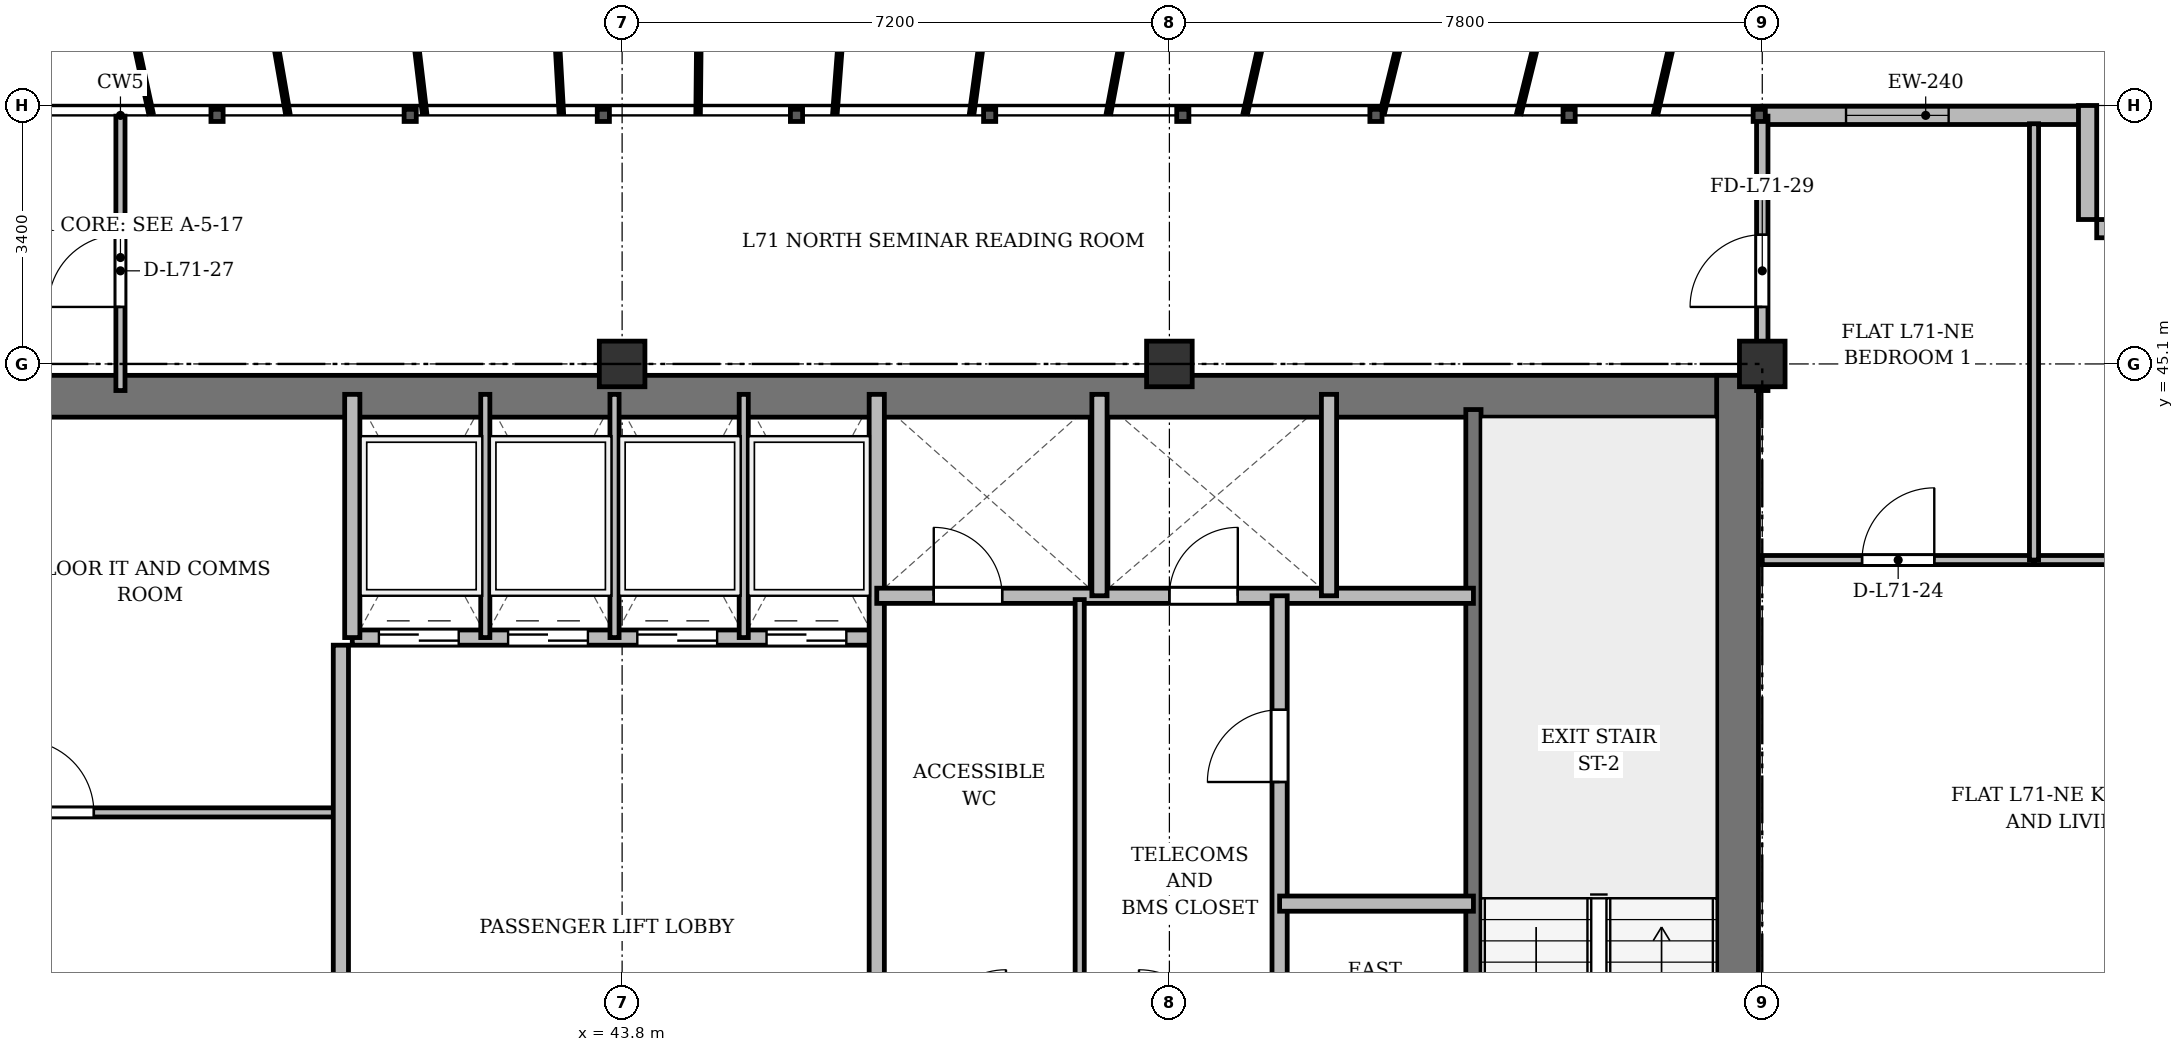
"""IFC4 building model, lengths in metres.
Left out: names, types, materials, properties, quantities, classifications, styles, units other than length and angle.
Written with IfcOpenShell. Run it as: python <this file> out.ifc"""

import sys

from ifc_helpers import new_model, si_unit, direction, frame, frame_2d, origin, origin_2d, place, context, subcontext, project, spatial, rectangle, extrude, source, transform, mapped, element, fill, save


model = new_model("IFC4")
c1 = context("Model", 3, precision=1e-05, world=origin(), true_north=direction((0.0, 1.0)))
c2 = subcontext(c1, "Body", "Model", "MODEL_VIEW")
j1 = project(units=[si_unit("LENGTHUNIT", "METRE"), si_unit("PLANEANGLEUNIT", "RADIAN")], contexts=[c1])
p1 = place(None, origin())
s1 = spatial("IfcSite", under=j1, at=p1, CompositionType="ELEMENT")
p2 = place(p1, origin())
s2 = spatial("IfcBuilding", under=s1, at=p2, CompositionType="ELEMENT")
p3 = place(p2, frame((0.0, 0.0, 273.9)))
s3 = spatial("IfcBuildingStorey", under=s2, at=p3, CompositionType="ELEMENT", Elevation=273.9)
m1 = source(origin(), c2, "Body", "SweptSolid", [
    extrude(rectangle(XDim=0.6, YDim=0.6, at=origin_2d()), origin(), (0.0, 0.0, 1.0), 3.6),
])
for number, where, z_axis, x_axis in (
    (1, (43.8, 45.1, 0.0), (0.0, 0.0, 1.0), (1.0, 0.0, 0.0)),
    (2, (51.0, 45.1, 0.0), (0.0, 0.0, 1.0), (1.0, 0.0, 0.0)),
    (3, (58.8, 45.1, 0.0), (0.0, 0.0, 1.0), (1.0, 0.0, 0.0)),
):
    element("IfcColumn", number, at=place(p3, frame(where, z_axis=z_axis, x_axis=x_axis)), inside=s3, PredefinedType="COLUMN", context=c2, shape_type="MappedRepresentation", body=[
        mapped(m1, transform((0.0, 0.0, 0.0), x_axis=(1.0, 0.0, 0.0), y_axis=(0.0, 1.0, 0.0), z_axis=(0.0, 0.0, 1.0), scale=1.0)),
    ])
p4 = place(p3, frame((58.8, 48.37, 0.0), z_axis=(0.0, 0.0, 1.0), x_axis=(1.0, 0.0, 0.0)))
e4 = element("IfcWall", 4, at=p4, inside=s3, PredefinedType="SOLIDWALL", context=c2, shape_type="SweptSolid", body=[
    extrude(rectangle(XDim=4.3, YDim=0.24, at=frame_2d((2.15, 0.0))), origin(), (0.0, 0.0, 1.0), 3.37),
])
p5 = place(p4, frame((1.102, 0.0, 0.9)))
e5 = element("IfcOpeningElement", 5, at=p5, cuts=e4, PredefinedType="OPENING", context=c2, shape_type="SweptSolid", body=[
    extrude(rectangle(XDim=1.35, YDim=1.5, at=frame_2d((0.675, 0.75))), frame((0.0, 0.13, 0.0), z_axis=(0.0, -1.0, 0.0), x_axis=(1.0, 0.0, 0.0)), (0.0, 0.0, 1.0), 0.26),
])
for number, where, z_axis, x_axis in (
    (6, (63.08, 48.5, 0.0), (0.0, 0.0, 1.0), (0.0, -1.0, 0.0)),
    (7, (63.2, 46.88, 0.0), (0.0, 0.0, 1.0), (1.0, 0.0, 0.0)),
):
    element("IfcWall", number, at=place(p3, frame(where, z_axis=z_axis, x_axis=x_axis)), inside=s3, PredefinedType="SOLIDWALL", context=c2, shape_type="SweptSolid", body=[
        extrude(rectangle(XDim=1.5, YDim=0.24, at=frame_2d((0.75, 0.0))), origin(), (0.0, 0.0, 1.0), 3.37),
    ])
p6 = place(p3, frame((15.65, 44.675, 0.0), z_axis=(0.0, 0.0, 1.0), x_axis=(1.0, 0.0, 0.0)))
e8 = element("IfcWall", 8, at=p6, inside=s3, PredefinedType="SHEAR", context=c2, shape_type="SweptSolid", body=[
    extrude(rectangle(XDim=43.1, YDim=0.55, at=frame_2d((21.55, 0.0))), origin(), (0.0, 0.0, 1.0), 3.37),
])
p7 = place(p3, frame((58.475, 33.4, 0.0), z_axis=(0.0, 0.0, 1.0), x_axis=(0.0, 1.0, 0.0)))
e9 = element("IfcWall", 9, at=p7, inside=s3, PredefinedType="SHEAR", context=c2, shape_type="SweptSolid", body=[
    extrude(rectangle(XDim=11.55, YDim=0.55, at=frame_2d((5.775, 0.0))), origin(), (0.0, 0.0, 1.0), 3.37),
])
p8 = place(p3, frame((55.0, 33.4, 0.0), z_axis=(0.0, 0.0, 1.0), x_axis=(0.0, 1.0, 0.0)))
e10 = element("IfcWall", 10, at=p8, inside=s3, PredefinedType="SHEAR", context=c2, shape_type="SweptSolid", body=[
    extrude(rectangle(XDim=11.1, YDim=0.2, at=frame_2d((5.55, 0.0))), origin(), (0.0, 0.0, 1.0), 3.37),
])
p9 = place(p8, frame((0.85, 0.0, 0.0)))
e11 = element("IfcOpeningElement", 11, at=p9, cuts=e10, PredefinedType="OPENING", context=c2, shape_type="SweptSolid", body=[
    extrude(rectangle(XDim=1.1, YDim=2.15, at=frame_2d((0.55, 1.075))), frame((0.0, 0.11, 0.0), z_axis=(0.0, -1.0, 0.0), x_axis=(1.0, 0.0, 0.0)), (0.0, 0.0, 1.0), 0.22),
])
p10 = place(p3, frame((33.3, 39.2, 0.0), z_axis=(0.0, 0.0, 1.0), x_axis=(1.0, 0.0, 0.0)))
e12 = element("IfcWall", 12, at=p10, inside=s3, PredefinedType="PARTITIONING", context=c2, shape_type="SweptSolid", body=[
    extrude(rectangle(XDim=6.8, YDim=0.12, at=frame_2d((3.4, 0.0))), origin(), (0.0, 0.0, 1.0), 3.37),
])
p11 = place(p10, frame((2.6, 0.0, 0.0)))
e13 = element("IfcOpeningElement", 13, at=p11, cuts=e12, PredefinedType="OPENING", context=c2, shape_type="SweptSolid", body=[
    extrude(rectangle(XDim=0.95, YDim=2.15, at=frame_2d((0.475, 1.075))), frame((0.0, 0.07, 0.0), z_axis=(0.0, -1.0, 0.0), x_axis=(1.0, 0.0, 0.0)), (0.0, 0.0, 1.0), 0.14),
])
p12 = place(p3, frame((40.1, 33.4, 0.0), z_axis=(0.0, 0.0, 1.0), x_axis=(0.0, 1.0, 0.0)))
e14 = element("IfcWall", 14, at=p12, inside=s3, PredefinedType="SOLIDWALL", context=c2, shape_type="SweptSolid", body=[
    extrude(rectangle(XDim=8.0, YDim=0.2, at=frame_2d((4.0, 0.0))), origin(), (0.0, 0.0, 1.0), 2.92),
])
p13 = place(p3, frame((40.25, 41.5, 0.0), z_axis=(0.0, 0.0, 1.0), x_axis=(1.0, 0.0, 0.0)))
e15 = element("IfcWall", 15, at=p13, inside=s3, PredefinedType="SOLIDWALL", context=c2, shape_type="SweptSolid", body=[
    extrude(rectangle(XDim=6.9, YDim=0.2, at=frame_2d((3.45, 0.0))), origin(), (0.0, 0.0, 1.0), 3.37),
])
p14 = place(p13, frame((0.35, 0.0, 0.0)))
e16 = element("IfcOpeningElement", 16, at=p14, cuts=e15, PredefinedType="OPENING", context=c2, shape_type="SweptSolid", body=[
    extrude(rectangle(XDim=1.05, YDim=2.15, at=frame_2d((0.525, 1.075))), frame((0.0, 0.11, 0.0), z_axis=(0.0, -1.0, 0.0), x_axis=(1.0, 0.0, 0.0)), (0.0, 0.0, 1.0), 0.22),
])
p15 = place(p13, frame((2.05, 0.0, 0.0)))
e17 = element("IfcOpeningElement", 17, at=p15, cuts=e15, PredefinedType="OPENING", context=c2, shape_type="SweptSolid", body=[
    extrude(rectangle(XDim=1.05, YDim=2.15, at=frame_2d((0.525, 1.075))), frame((0.0, 0.11, 0.0), z_axis=(0.0, -1.0, 0.0), x_axis=(1.0, 0.0, 0.0)), (0.0, 0.0, 1.0), 0.22),
])
p16 = place(p13, frame((3.75, 0.0, 0.0)))
e18 = element("IfcOpeningElement", 18, at=p16, cuts=e15, PredefinedType="OPENING", context=c2, shape_type="SweptSolid", body=[
    extrude(rectangle(XDim=1.05, YDim=2.15, at=frame_2d((0.525, 1.075))), frame((0.0, 0.11, 0.0), z_axis=(0.0, -1.0, 0.0), x_axis=(1.0, 0.0, 0.0)), (0.0, 0.0, 1.0), 0.22),
])
p17 = place(p13, frame((5.45, 0.0, 0.0)))
e19 = element("IfcOpeningElement", 19, at=p17, cuts=e15, PredefinedType="OPENING", context=c2, shape_type="SweptSolid", body=[
    extrude(rectangle(XDim=1.05, YDim=2.15, at=frame_2d((0.525, 1.075))), frame((0.0, 0.11, 0.0), z_axis=(0.0, -1.0, 0.0), x_axis=(1.0, 0.0, 0.0)), (0.0, 0.0, 1.0), 0.22),
])
p18 = place(p3, frame((40.25, 41.5, 0.0), z_axis=(0.0, 0.0, 1.0), x_axis=(0.0, 1.0, 0.0)))
e20 = element("IfcWall", 20, at=p18, inside=s3, PredefinedType="SOLIDWALL", context=c2, shape_type="SweptSolid", body=[
    extrude(rectangle(XDim=3.2, YDim=0.2, at=frame_2d((1.6, 0.0))), origin(), (0.0, 0.0, 1.0), 3.37),
])
for number, where, z_axis, x_axis in (
    (21, (42.0, 41.5, 0.0), (0.0, 0.0, 1.0), (0.0, 1.0, 0.0)),
    (22, (43.7, 41.5, 0.0), (0.0, 0.0, 1.0), (0.0, 1.0, 0.0)),
    (23, (45.4, 41.5, 0.0), (0.0, 0.0, 1.0), (0.0, 1.0, 0.0)),
):
    element("IfcWall", number, at=place(p3, frame(where, z_axis=z_axis, x_axis=x_axis)), inside=s3, PredefinedType="PARTITIONING", context=c2, shape_type="SweptSolid", body=[
        extrude(rectangle(XDim=3.2, YDim=0.12, at=frame_2d((1.6, 0.0))), origin(), (0.0, 0.0, 1.0), 3.37),
    ])
p19 = place(p3, frame((47.15, 33.4, 0.0), z_axis=(0.0, 0.0, 1.0), x_axis=(0.0, 1.0, 0.0)))
e24 = element("IfcWall", 24, at=p19, inside=s3, PredefinedType="SOLIDWALL", context=c2, shape_type="SweptSolid", body=[
    extrude(rectangle(XDim=11.3, YDim=0.2, at=frame_2d((5.65, 0.0))), origin(), (0.0, 0.0, 1.0), 2.92),
])
p20 = place(p3, frame((47.15, 42.05, 0.0), z_axis=(0.0, 0.0, 1.0), x_axis=(1.0, 0.0, 0.0)))
e25 = element("IfcWall", 25, at=p20, inside=s3, PredefinedType="SOLIDWALL", context=c2, shape_type="SweptSolid", body=[
    extrude(rectangle(XDim=7.85, YDim=0.2, at=frame_2d((3.925, 0.0))), origin(), (0.0, 0.0, 1.0), 2.87),
])
p21 = place(p20, frame((0.75, 0.0, 0.0)))
e26 = element("IfcOpeningElement", 26, at=p21, cuts=e25, PredefinedType="OPENING", context=c2, shape_type="SweptSolid", body=[
    extrude(rectangle(XDim=0.9, YDim=2.1, at=frame_2d((0.45, 1.05))), frame((0.0, 0.11, 0.0), z_axis=(0.0, -1.0, 0.0), x_axis=(1.0, 0.0, 0.0)), (0.0, 0.0, 1.0), 0.22),
])
p22 = place(p20, frame((3.85, 0.0, 0.0)))
e27 = element("IfcOpeningElement", 27, at=p22, cuts=e25, PredefinedType="OPENING", context=c2, shape_type="SweptSolid", body=[
    extrude(rectangle(XDim=0.9, YDim=2.1, at=frame_2d((0.45, 1.05))), frame((0.0, 0.11, 0.0), z_axis=(0.0, -1.0, 0.0), x_axis=(1.0, 0.0, 0.0)), (0.0, 0.0, 1.0), 0.22),
])
for number, where, z_axis, x_axis in (
    (28, (50.08, 42.05, 0.0), (0.0, 0.0, 1.0), (0.0, 1.0, 0.0)),
    (29, (53.1, 42.05, 0.0), (0.0, 0.0, 1.0), (0.0, 1.0, 0.0)),
):
    element("IfcWall", number, at=place(p3, frame(where, z_axis=z_axis, x_axis=x_axis)), inside=s3, PredefinedType="SOLIDWALL", context=c2, shape_type="SweptSolid", body=[
        extrude(rectangle(XDim=2.65, YDim=0.2, at=frame_2d((1.325, 0.0))), origin(), (0.0, 0.0, 1.0), 3.37),
    ])
p23 = place(p3, frame((52.45, 33.4, 0.0), z_axis=(0.0, 0.0, 1.0), x_axis=(0.0, 1.0, 0.0)))
e30 = element("IfcWall", 30, at=p23, inside=s3, PredefinedType="PARTITIONING", context=c2, shape_type="SweptSolid", body=[
    extrude(rectangle(XDim=8.65, YDim=0.2, at=frame_2d((4.325, 0.0))), origin(), (0.0, 0.0, 1.0), 2.92),
])
p24 = place(p23, frame((6.2, 0.0, 0.0)))
e31 = element("IfcOpeningElement", 31, at=p24, cuts=e30, PredefinedType="OPENING", context=c2, shape_type="SweptSolid", body=[
    extrude(rectangle(XDim=0.95, YDim=2.15, at=frame_2d((0.475, 1.075))), frame((0.0, 0.11, 0.0), z_axis=(0.0, -1.0, 0.0), x_axis=(1.0, 0.0, 0.0)), (0.0, 0.0, 1.0), 0.22),
])
p25 = place(p3, frame((52.45, 38.0, 0.0), z_axis=(0.0, 0.0, 1.0), x_axis=(1.0, 0.0, 0.0)))
e32 = element("IfcWall", 32, at=p25, inside=s3, PredefinedType="PARTITIONING", context=c2, shape_type="SweptSolid", body=[
    extrude(rectangle(XDim=2.55, YDim=0.2, at=frame_2d((1.275, 0.0))), origin(), (0.0, 0.0, 1.0), 3.37),
])
p26 = place(p3, frame((49.82, 36.18, 0.0), z_axis=(0.0, 0.0, 1.0), x_axis=(0.0, 1.0, 0.0)))
e33 = element("IfcWall", 33, at=p26, inside=s3, PredefinedType="PARTITIONING", context=c2, shape_type="SweptSolid", body=[
    extrude(rectangle(XDim=5.82, YDim=0.12, at=frame_2d((2.91, 0.0))), origin(), (0.0, 0.0, 1.0), 3.37),
])
p27 = place(p3, frame((58.8, 42.52, 0.0), z_axis=(0.0, 0.0, 1.0), x_axis=(1.0, 0.0, 0.0)))
e34 = element("IfcWall", 34, at=p27, inside=s3, PredefinedType="PARTITIONING", context=c2, shape_type="SweptSolid", body=[
    extrude(rectangle(XDim=3.575, YDim=0.12, at=frame_2d((1.788, 0.0))), origin(), (0.0, 0.0, 1.0), 2.87),
])
p28 = place(p27, frame((1.313, 0.0, 0.0)))
e35 = element("IfcOpeningElement", 35, at=p28, cuts=e34, PredefinedType="OPENING", context=c2, shape_type="SweptSolid", body=[
    extrude(rectangle(XDim=0.95, YDim=2.15, at=frame_2d((0.475, 1.075))), frame((0.0, 0.07, 0.0), z_axis=(0.0, -1.0, 0.0), x_axis=(1.0, 0.0, 0.0)), (0.0, 0.0, 1.0), 0.14),
])
p29 = place(p3, frame((62.375, 42.52, 0.0), z_axis=(0.0, 0.0, 1.0), x_axis=(1.0, 0.0, 0.0)))
e36 = element("IfcWall", 36, at=p29, inside=s3, PredefinedType="PARTITIONING", context=c2, shape_type="SweptSolid", body=[
    extrude(rectangle(XDim=3.575, YDim=0.12, at=frame_2d((1.788, 0.0))), origin(), (0.0, 0.0, 1.0), 2.87),
])
p30 = place(p29, frame((1.126, 0.0, 0.0)))
e37 = element("IfcOpeningElement", 37, at=p30, cuts=e36, PredefinedType="OPENING", context=c2, shape_type="SweptSolid", body=[
    extrude(rectangle(XDim=0.95, YDim=2.15, at=frame_2d((0.475, 1.075))), frame((0.0, 0.07, 0.0), z_axis=(0.0, -1.0, 0.0), x_axis=(1.0, 0.0, 0.0)), (0.0, 0.0, 1.0), 0.14),
])
p31 = place(p3, frame((62.375, 42.52, 0.0), z_axis=(0.0, 0.0, 1.0), x_axis=(0.0, 1.0, 0.0)))
e38 = element("IfcWall", 38, at=p31, inside=s3, PredefinedType="PARTITIONING", context=c2, shape_type="SweptSolid", body=[
    extrude(rectangle(XDim=5.74, YDim=0.12, at=frame_2d((2.87, 0.0))), origin(), (0.0, 0.0, 1.0), 2.92),
])
p32 = place(p3, frame((37.2, 44.75, 0.0), z_axis=(0.0, 0.0, 1.0), x_axis=(0.0, 1.0, 0.0)))
e39 = element("IfcWall", 39, at=p32, inside=s3, PredefinedType="PARTITIONING", context=c2, shape_type="SweptSolid", body=[
    extrude(rectangle(XDim=3.61, YDim=0.12, at=frame_2d((1.805, 0.0))), origin(), (0.0, 0.0, 1.0), 2.92),
])
p33 = place(p32, frame((1.1, 0.0, 0.0)))
e40 = element("IfcOpeningElement", 40, at=p33, cuts=e39, PredefinedType="OPENING", context=c2, shape_type="SweptSolid", body=[
    extrude(rectangle(XDim=0.95, YDim=2.15, at=frame_2d((0.475, 1.075))), frame((0.0, 0.07, 0.0), z_axis=(0.0, -1.0, 0.0), x_axis=(1.0, 0.0, 0.0)), (0.0, 0.0, 1.0), 0.14),
])
p34 = place(p3, frame((58.8, 44.75, 0.0), z_axis=(0.0, 0.0, 1.0), x_axis=(0.0, 1.0, 0.0)))
e41 = element("IfcWall", 41, at=p34, inside=s3, PredefinedType="PARTITIONING", context=c2, shape_type="SweptSolid", body=[
    extrude(rectangle(XDim=3.61, YDim=0.15, at=frame_2d((1.805, 0.0))), origin(), (0.0, 0.0, 1.0), 2.87),
])
p35 = place(p34, frame((1.1, 0.0, 0.0)))
e42 = element("IfcOpeningElement", 42, at=p35, cuts=e41, PredefinedType="OPENING", context=c2, shape_type="SweptSolid", body=[
    extrude(rectangle(XDim=0.95, YDim=2.15, at=frame_2d((0.475, 1.075))), frame((0.0, 0.085, 0.0), z_axis=(0.0, -1.0, 0.0), x_axis=(1.0, 0.0, 0.0)), (0.0, 0.0, 1.0), 0.17),
])
m2 = source(origin(), c2, "Body", "SweptSolid", [
    extrude(rectangle(XDim=1.35, YDim=1.5, at=frame_2d((0.675, 0.75))), frame((0.0, 0.03, 0.0), z_axis=(0.0, -1.0, 0.0), x_axis=(1.0, 0.0, 0.0)), (0.0, 0.0, 1.0), 0.06),
])
p36 = place(p5, origin())
e43 = element("IfcWindow", 43, at=p36, inside=s3, PartitioningType="SINGLE_PANEL", PredefinedType="WINDOW", context=c2, shape_type="MappedRepresentation", body=[
    mapped(m2, transform((0.0, 0.0, 0.0), x_axis=(1.0, 0.0, 0.0), y_axis=(0.0, 1.0, 0.0), z_axis=(0.0, 0.0, 1.0), scale=1.0)),
])
fill(e5, e43)
m3 = source(origin(), c2, "Body", "SweptSolid", [
    extrude(rectangle(XDim=0.95, YDim=2.15, at=frame_2d((0.475, 1.075))), frame((0.0, 0.025, 0.0), z_axis=(0.0, -1.0, 0.0), x_axis=(1.0, 0.0, 0.0)), (0.0, 0.0, 1.0), 0.05),
])
p37 = place(p11, origin())
e44 = element("IfcDoor", 44, at=p37, inside=s3, OperationType="SINGLE_SWING_LEFT", PredefinedType="DOOR", context=c2, shape_type="MappedRepresentation", body=[
    mapped(m3, transform((0.0, 0.0, 0.0), x_axis=(1.0, 0.0, 0.0), y_axis=(0.0, 1.0, 0.0), z_axis=(0.0, 0.0, 1.0), scale=1.0)),
])
fill(e13, e44)
m4 = source(origin(), c2, "Body", "SweptSolid", [
    extrude(rectangle(XDim=1.05, YDim=2.15, at=frame_2d((0.525, 1.075))), frame((0.0, 0.025, 0.0), z_axis=(0.0, -1.0, 0.0), x_axis=(1.0, 0.0, 0.0)), (0.0, 0.0, 1.0), 0.05),
])
p38 = place(p14, origin())
e45 = element("IfcDoor", 45, at=p38, inside=s3, OperationType="DOUBLE_DOOR_SLIDING", PredefinedType="DOOR", context=c2, shape_type="MappedRepresentation", body=[
    mapped(m4, transform((0.0, 0.0, 0.0), x_axis=(1.0, 0.0, 0.0), y_axis=(0.0, 1.0, 0.0), z_axis=(0.0, 0.0, 1.0), scale=1.0)),
])
fill(e16, e45)
p39 = place(p15, origin())
e46 = element("IfcDoor", 46, at=p39, inside=s3, OperationType="DOUBLE_DOOR_SLIDING", PredefinedType="DOOR", context=c2, shape_type="MappedRepresentation", body=[
    mapped(m4, transform((0.0, 0.0, 0.0), x_axis=(1.0, 0.0, 0.0), y_axis=(0.0, 1.0, 0.0), z_axis=(0.0, 0.0, 1.0), scale=1.0)),
])
fill(e17, e46)
p40 = place(p16, origin())
e47 = element("IfcDoor", 47, at=p40, inside=s3, OperationType="DOUBLE_DOOR_SLIDING", PredefinedType="DOOR", context=c2, shape_type="MappedRepresentation", body=[
    mapped(m4, transform((0.0, 0.0, 0.0), x_axis=(1.0, 0.0, 0.0), y_axis=(0.0, 1.0, 0.0), z_axis=(0.0, 0.0, 1.0), scale=1.0)),
])
fill(e18, e47)
p41 = place(p17, origin())
e48 = element("IfcDoor", 48, at=p41, inside=s3, OperationType="DOUBLE_DOOR_SLIDING", PredefinedType="DOOR", context=c2, shape_type="MappedRepresentation", body=[
    mapped(m4, transform((0.0, 0.0, 0.0), x_axis=(1.0, 0.0, 0.0), y_axis=(0.0, 1.0, 0.0), z_axis=(0.0, 0.0, 1.0), scale=1.0)),
])
fill(e19, e48)
m5 = source(origin(), c2, "Body", "SweptSolid", [
    extrude(rectangle(XDim=0.9, YDim=2.1, at=frame_2d((0.45, 1.05))), frame((0.0, 0.025, 0.0), z_axis=(0.0, -1.0, 0.0), x_axis=(1.0, 0.0, 0.0)), (0.0, 0.0, 1.0), 0.05),
])
p42 = place(p21, origin())
e49 = element("IfcDoor", 49, at=p42, inside=s3, OperationType="SINGLE_SWING_LEFT", PredefinedType="DOOR", context=c2, shape_type="MappedRepresentation", body=[
    mapped(m5, transform((0.0, 0.0, 0.0), x_axis=(1.0, 0.0, 0.0), y_axis=(0.0, 1.0, 0.0), z_axis=(0.0, 0.0, 1.0), scale=1.0)),
])
fill(e26, e49)
p43 = place(p22, origin())
e50 = element("IfcDoor", 50, at=p43, inside=s3, OperationType="SINGLE_SWING_RIGHT", PredefinedType="DOOR", context=c2, shape_type="MappedRepresentation", body=[
    mapped(m5, transform((0.0, 0.0, 0.0), x_axis=(1.0, 0.0, 0.0), y_axis=(0.0, 1.0, 0.0), z_axis=(0.0, 0.0, 1.0), scale=1.0)),
])
fill(e27, e50)
p44 = place(p24, origin())
e51 = element("IfcDoor", 51, at=p44, inside=s3, OperationType="SINGLE_SWING_LEFT", PredefinedType="DOOR", context=c2, shape_type="MappedRepresentation", body=[
    mapped(m3, transform((0.0, 0.0, 0.0), x_axis=(1.0, 0.0, 0.0), y_axis=(0.0, 1.0, 0.0), z_axis=(0.0, 0.0, 1.0), scale=1.0)),
])
fill(e31, e51)
p45 = place(p28, origin())
e52 = element("IfcDoor", 52, at=p45, inside=s3, OperationType="SINGLE_SWING_RIGHT", PredefinedType="DOOR", context=c2, shape_type="MappedRepresentation", body=[
    mapped(m3, transform((0.0, 0.0, 0.0), x_axis=(1.0, 0.0, 0.0), y_axis=(0.0, 1.0, 0.0), z_axis=(0.0, 0.0, 1.0), scale=1.0)),
])
fill(e35, e52)
p46 = place(p33, origin())
e53 = element("IfcDoor", 53, at=p46, inside=s3, OperationType="SINGLE_SWING_LEFT", PredefinedType="DOOR", context=c2, shape_type="MappedRepresentation", body=[
    mapped(m3, transform((0.0, 0.0, 0.0), x_axis=(1.0, 0.0, 0.0), y_axis=(0.0, 1.0, 0.0), z_axis=(0.0, 0.0, 1.0), scale=1.0)),
])
fill(e40, e53)
p47 = place(p35, origin())
e54 = element("IfcDoor", 54, at=p47, inside=s3, OperationType="SINGLE_SWING_LEFT", PredefinedType="DOOR", context=c2, shape_type="MappedRepresentation", body=[
    mapped(m3, transform((0.0, 0.0, 0.0), x_axis=(1.0, 0.0, 0.0), y_axis=(0.0, 1.0, 0.0), z_axis=(0.0, 0.0, 1.0), scale=1.0)),
])
fill(e42, e54)
save(model, sys.argv[1])
